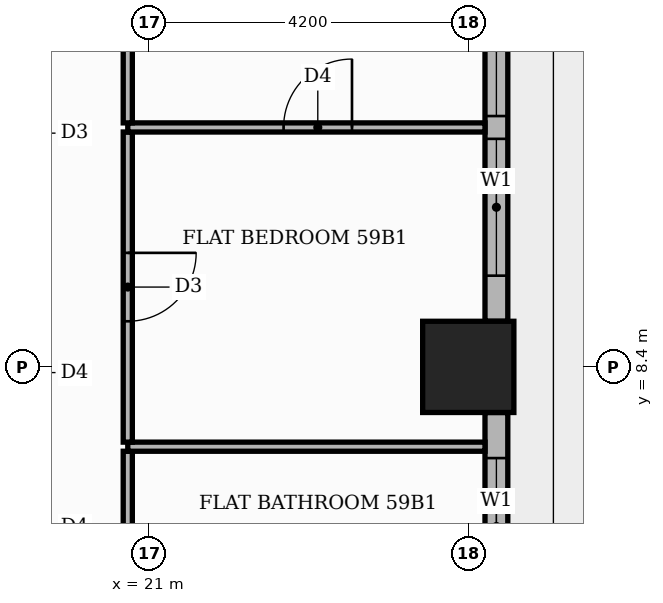
"""IFC4 building model, lengths in metres.
Left out: names, types, materials, properties, quantities, classifications, styles, units other than length and angle.
Written with IfcOpenShell. Run it as: python <this file> out.ifc"""

import sys

from ifc_helpers import new_model, si_unit, direction, frame, frame_2d, origin, origin_2d, place, context, subcontext, project, spatial, rectangle, extrude, element, fill, save


model = new_model("IFC4")
c1 = context("Model", 3, precision=1e-05, world=origin(), true_north=direction((0.0, 1.0)))
c2 = subcontext(c1, "Body", "Model", "MODEL_VIEW")
j1 = project(units=[si_unit("LENGTHUNIT", "METRE"), si_unit("PLANEANGLEUNIT", "RADIAN")], contexts=[c1])
p1 = place(None, origin())
s1 = spatial("IfcSite", under=j1, at=p1, CompositionType="ELEMENT")
p2 = place(p1, origin())
s2 = spatial("IfcBuilding", under=s1, at=p2, CompositionType="ELEMENT")
p3 = place(p2, frame((0.0, 0.0, 248.4)))
s3 = spatial("IfcBuildingStorey", under=s2, at=p3, CompositionType="ELEMENT", Elevation=248.4)
p4 = place(p3, frame((25.2, 8.4, 0.0), z_axis=(0.0, 0.0, 1.0), x_axis=(1.0, 0.0, 0.0)))
e1 = element("IfcColumn", 1, at=p4, inside=s3, PredefinedType="COLUMN", context=c2, shape_type="SweptSolid", body=[
    extrude(rectangle(XDim=1.2, YDim=1.2, at=origin_2d()), origin(), (0.0, 0.0, 1.0), 3.9),
])
p5 = place(p3, frame((25.57, 0.6, 0.0), z_axis=(0.0, 0.0, 1.0), x_axis=(0.0, 1.0, 0.0)))
e2 = element("IfcWall", 2, at=p5, inside=s3, PredefinedType="STANDARD", context=c2, shape_type="SweptSolid", body=[
    extrude(rectangle(XDim=7.2, YDim=0.3, at=frame_2d((3.6, 0.0))), origin(), (0.0, 0.0, 1.0), 3.48),
])
p6 = place(p5, frame((0.6, 0.0, 0.0)))
e3 = element("IfcOpeningElement", 3, at=p6, cuts=e2, PredefinedType="OPENING", context=c2, shape_type="SweptSolid", body=[
    extrude(rectangle(XDim=1.8, YDim=2.4, at=frame_2d((0.9, 1.2))), frame((0.0, 0.16, 0.0), z_axis=(0.0, -1.0, 0.0), x_axis=(1.0, 0.0, 0.0)), (0.0, 0.0, 1.0), 0.32),
])
p7 = place(p5, frame((2.7, 0.0, 0.9)))
e4 = element("IfcOpeningElement", 4, at=p7, cuts=e2, PredefinedType="OPENING", context=c2, shape_type="SweptSolid", body=[
    extrude(rectangle(XDim=1.8, YDim=2.1, at=frame_2d((0.9, 1.05))), frame((0.0, 0.16, 0.0), z_axis=(0.0, -1.0, 0.0), x_axis=(1.0, 0.0, 0.0)), (0.0, 0.0, 1.0), 0.32),
])
p8 = place(p5, frame((4.8, 0.0, 0.9)))
e5 = element("IfcOpeningElement", 5, at=p8, cuts=e2, PredefinedType="OPENING", context=c2, shape_type="SweptSolid", body=[
    extrude(rectangle(XDim=1.8, YDim=2.1, at=frame_2d((0.9, 1.05))), frame((0.0, 0.16, 0.0), z_axis=(0.0, -1.0, 0.0), x_axis=(1.0, 0.0, 0.0)), (0.0, 0.0, 1.0), 0.32),
])
p9 = place(p3, frame((25.57, 9.0, 0.0), z_axis=(0.0, 0.0, 1.0), x_axis=(0.0, 1.0, 0.0)))
e6 = element("IfcWall", 6, at=p9, inside=s3, PredefinedType="STANDARD", context=c2, shape_type="SweptSolid", body=[
    extrude(rectangle(XDim=7.2, YDim=0.3, at=frame_2d((3.6, 0.0))), origin(), (0.0, 0.0, 1.0), 3.48),
])
p10 = place(p9, frame((0.6, 0.0, 0.9)))
e7 = element("IfcOpeningElement", 7, at=p10, cuts=e6, PredefinedType="OPENING", context=c2, shape_type="SweptSolid", body=[
    extrude(rectangle(XDim=1.8, YDim=2.1, at=frame_2d((0.9, 1.05))), frame((0.0, 0.16, 0.0), z_axis=(0.0, -1.0, 0.0), x_axis=(1.0, 0.0, 0.0)), (0.0, 0.0, 1.0), 0.32),
])
p11 = place(p9, frame((2.7, 0.0, 0.9)))
e8 = element("IfcOpeningElement", 8, at=p11, cuts=e6, PredefinedType="OPENING", context=c2, shape_type="SweptSolid", body=[
    extrude(rectangle(XDim=1.8, YDim=2.1, at=frame_2d((0.9, 1.05))), frame((0.0, 0.16, 0.0), z_axis=(0.0, -1.0, 0.0), x_axis=(1.0, 0.0, 0.0)), (0.0, 0.0, 1.0), 0.32),
])
p12 = place(p9, frame((4.8, 0.0, 0.9)))
e9 = element("IfcOpeningElement", 9, at=p12, cuts=e6, PredefinedType="OPENING", context=c2, shape_type="SweptSolid", body=[
    extrude(rectangle(XDim=1.8, YDim=2.1, at=frame_2d((0.9, 1.05))), frame((0.0, 0.16, 0.0), z_axis=(0.0, -1.0, 0.0), x_axis=(1.0, 0.0, 0.0)), (0.0, 0.0, 1.0), 0.32),
])
p13 = place(p3, frame((20.72, 5.31, 0.0), z_axis=(0.0, 0.0, 1.0), x_axis=(0.0, 1.0, 0.0)))
e10 = element("IfcWall", 10, at=p13, inside=s3, PredefinedType="PARTITIONING", context=c2, shape_type="SweptSolid", body=[
    extrude(rectangle(XDim=1.98, YDim=0.12, at=frame_2d((0.99, 0.0))), origin(), (0.0, 0.0, 1.0), 3.48),
])
p14 = place(p3, frame((20.72, 7.35, 0.0), z_axis=(0.0, 0.0, 1.0), x_axis=(1.0, 0.0, 0.0)))
e11 = element("IfcWall", 11, at=p14, inside=s3, PredefinedType="PARTITIONING", context=c2, shape_type="SweptSolid", body=[
    extrude(rectangle(XDim=4.7, YDim=0.12, at=frame_2d((2.35, 0.0))), origin(), (0.0, 0.0, 1.0), 3.48),
])
p15 = place(p3, frame((20.72, 7.41, 0.0), z_axis=(0.0, 0.0, 1.0), x_axis=(0.0, 1.0, 0.0)))
e12 = element("IfcWall", 12, at=p15, inside=s3, PredefinedType="PARTITIONING", context=c2, shape_type="SweptSolid", body=[
    extrude(rectangle(XDim=4.08, YDim=0.12, at=frame_2d((2.04, 0.0))), origin(), (0.0, 0.0, 1.0), 3.48),
])
p16 = place(p15, frame((1.59, 0.0, 0.0)))
e13 = element("IfcOpeningElement", 13, at=p16, cuts=e12, PredefinedType="OPENING", context=c2, shape_type="SweptSolid", body=[
    extrude(rectangle(XDim=0.9, YDim=2.1, at=frame_2d((0.45, 1.05))), frame((0.0, 0.07, 0.0), z_axis=(0.0, -1.0, 0.0), x_axis=(1.0, 0.0, 0.0)), (0.0, 0.0, 1.0), 0.14),
])
p17 = place(p3, frame((20.72, 11.55, 0.0), z_axis=(0.0, 0.0, 1.0), x_axis=(1.0, 0.0, 0.0)))
e14 = element("IfcWall", 14, at=p17, inside=s3, PredefinedType="PARTITIONING", context=c2, shape_type="SweptSolid", body=[
    extrude(rectangle(XDim=4.7, YDim=0.12, at=frame_2d((2.35, 0.0))), origin(), (0.0, 0.0, 1.0), 3.48),
])
p18 = place(p17, frame((2.05, 0.0, 0.0)))
e15 = element("IfcOpeningElement", 15, at=p18, cuts=e14, PredefinedType="OPENING", context=c2, shape_type="SweptSolid", body=[
    extrude(rectangle(XDim=0.9, YDim=2.1, at=frame_2d((0.45, 1.05))), frame((0.0, 0.07, 0.0), z_axis=(0.0, -1.0, 0.0), x_axis=(1.0, 0.0, 0.0)), (0.0, 0.0, 1.0), 0.14),
])
p19 = place(p3, frame((20.72, 11.61, 0.0), z_axis=(0.0, 0.0, 1.0), x_axis=(0.0, 1.0, 0.0)))
e16 = element("IfcWall", 16, at=p19, inside=s3, PredefinedType="PARTITIONING", context=c2, shape_type="SweptSolid", body=[
    extrude(rectangle(XDim=1.94, YDim=0.12, at=frame_2d((0.97, 0.0))), origin(), (0.0, 0.0, 1.0), 3.48),
])
p20 = place(p8, origin())
e17 = element("IfcWindow", 17, at=p20, inside=s3, PartitioningType="SINGLE_PANEL", PredefinedType="WINDOW", context=c2, shape_type="SweptSolid", body=[
    extrude(rectangle(XDim=1.8, YDim=2.1, at=frame_2d((0.9, 1.05))), frame((0.0, 0.03, 0.0), z_axis=(0.0, -1.0, 0.0), x_axis=(1.0, 0.0, 0.0)), (0.0, 0.0, 1.0), 0.06),
])
fill(e5, e17)
p21 = place(p10, origin())
e18 = element("IfcWindow", 18, at=p21, inside=s3, PartitioningType="SINGLE_PANEL", PredefinedType="WINDOW", context=c2, shape_type="SweptSolid", body=[
    extrude(rectangle(XDim=1.8, YDim=2.1, at=frame_2d((0.9, 1.05))), frame((0.0, 0.03, 0.0), z_axis=(0.0, -1.0, 0.0), x_axis=(1.0, 0.0, 0.0)), (0.0, 0.0, 1.0), 0.06),
])
fill(e7, e18)
p22 = place(p11, origin())
e19 = element("IfcWindow", 19, at=p22, inside=s3, PartitioningType="SINGLE_PANEL", PredefinedType="WINDOW", context=c2, shape_type="SweptSolid", body=[
    extrude(rectangle(XDim=1.8, YDim=2.1, at=frame_2d((0.9, 1.05))), frame((0.0, 0.03, 0.0), z_axis=(0.0, -1.0, 0.0), x_axis=(1.0, 0.0, 0.0)), (0.0, 0.0, 1.0), 0.06),
])
fill(e8, e19)
p23 = place(p16, frame((0.9, 0.0, 0.0), z_axis=(0.0, 0.0, 1.0), x_axis=(-1.0, 0.0, 0.0)))
e20 = element("IfcDoor", 20, at=p23, inside=s3, OperationType="SINGLE_SWING_RIGHT", PredefinedType="DOOR", context=c2, shape_type="SweptSolid", body=[
    extrude(rectangle(XDim=0.9, YDim=2.1, at=frame_2d((0.45, 1.05))), frame((0.0, 0.025, 0.0), z_axis=(0.0, -1.0, 0.0), x_axis=(1.0, 0.0, 0.0)), (0.0, 0.0, 1.0), 0.05),
])
fill(e13, e20)
p24 = place(p18, origin())
e21 = element("IfcDoor", 21, at=p24, inside=s3, OperationType="SINGLE_SWING_RIGHT", PredefinedType="DOOR", context=c2, shape_type="SweptSolid", body=[
    extrude(rectangle(XDim=0.9, YDim=2.1, at=frame_2d((0.45, 1.05))), frame((0.0, 0.025, 0.0), z_axis=(0.0, -1.0, 0.0), x_axis=(1.0, 0.0, 0.0)), (0.0, 0.0, 1.0), 0.05),
])
fill(e15, e21)
save(model, sys.argv[1])
